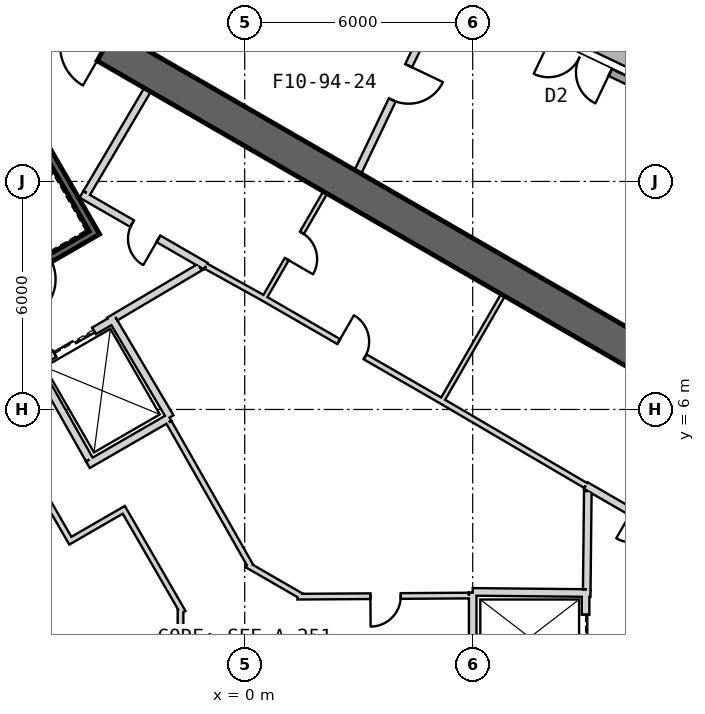
"""IFC4 building model, lengths in metres.
Left out: names, types, materials, properties, quantities, classifications, styles, units other than length and angle.
Written with IfcOpenShell. Run it as: python <this file> out.ifc"""

import sys

from ifc_helpers import new_model, si_unit, direction, frame, frame_2d, origin, place, context, subcontext, project, spatial, rectangle, extrude, element, fill, save


model = new_model("IFC4")
c1 = context("Model", 3, precision=1e-05, world=origin(), true_north=direction((0.0, 1.0)))
c2 = subcontext(c1, "Body", "Model", "MODEL_VIEW")
j1 = project(units=[si_unit("LENGTHUNIT", "METRE"), si_unit("PLANEANGLEUNIT", "RADIAN")], contexts=[c1])
p1 = place(None, origin())
s1 = spatial("IfcSite", under=j1, at=p1, CompositionType="ELEMENT")
p2 = place(p1, origin())
s2 = spatial("IfcBuilding", under=s1, at=p2, CompositionType="ELEMENT")
p3 = place(p2, frame((0.0, 0.0, 415.3)))
s3 = spatial("IfcBuildingStorey", under=s2, at=p3, CompositionType="ELEMENT", Elevation=415.3)
p4 = place(p3, frame((19.475, 2.208, 0.0), z_axis=(0.0, 0.0, 1.0), x_axis=(-0.866028369851, 0.499994862586, 0.0)))
e1 = element("IfcWall", 1, at=p4, inside=s3, PredefinedType="SHEAR", context=c2, shape_type="SweptSolid", body=[
    extrude(rectangle(XDim=31.523, YDim=0.9, at=frame_2d((15.762, 0.0))), origin(), (0.0, 0.0, 1.0), 5.0),
])
p5 = place(p4, frame((3.612, 0.0, 0.0)))
e2 = element("IfcOpeningElement", 2, at=p5, cuts=e1, PredefinedType="OPENING", context=c2, shape_type="SweptSolid", body=[
    extrude(rectangle(XDim=1.2, YDim=2.4, at=frame_2d((0.6, 1.2))), frame((0.0, 0.46, 0.0), z_axis=(0.0, -1.0, 0.0), x_axis=(1.0, 0.0, 0.0)), (0.0, 0.0, 1.0), 0.92),
])
p6 = place(p4, frame((26.712, 0.0, 0.0)))
e3 = element("IfcOpeningElement", 3, at=p6, cuts=e1, PredefinedType="OPENING", context=c2, shape_type="SweptSolid", body=[
    extrude(rectangle(XDim=1.2, YDim=2.4, at=frame_2d((0.6, 1.2))), frame((0.0, 0.46, 0.0), z_axis=(0.0, -1.0, 0.0), x_axis=(1.0, 0.0, 0.0)), (0.0, 0.0, 1.0), 0.92),
])
p7 = place(p3, frame((12.407, 13.534, 0.0), z_axis=(0.0, 0.0, 1.0), x_axis=(-0.902318881861, 0.431069177091, 0.0)))
e4 = element("IfcWall", 4, at=p7, inside=s3, PredefinedType="SOLIDWALL", context=c2, shape_type="SweptSolid", body=[
    extrude(rectangle(XDim=7.984, YDim=0.2, at=frame_2d((3.992, 0.0))), origin(), (0.0, 0.0, 1.0), 4.75),
])
p8 = place(p7, frame((3.092, 0.0, 0.0)))
e5 = element("IfcOpeningElement", 5, at=p8, cuts=e4, PredefinedType="OPENING", context=c2, shape_type="SweptSolid", body=[
    extrude(rectangle(XDim=1.8, YDim=2.4, at=frame_2d((0.9, 1.2))), frame((0.0, 0.11, 0.0), z_axis=(0.0, -1.0, 0.0), x_axis=(1.0, 0.0, 0.0)), (0.0, 0.0, 1.0), 0.22),
])
p9 = place(p3, frame((-2.391, 21.84, 0.04), z_axis=(0.0, 0.0, 1.0), x_axis=(0.902315972125, -0.43107526773, 0.0)))
e6 = element("IfcWall", 6, at=p9, inside=s3, PredefinedType="PARAPET", context=c2, shape_type="SweptSolid", body=[
    extrude(rectangle(XDim=26.04, YDim=0.25, at=frame_2d((13.02, 0.0))), origin(), (0.0, 0.0, 1.0), 1.2),
])
p10 = place(p3, frame((-2.146, 21.113, 0.04), z_axis=(0.0, 0.0, 1.0), x_axis=(0.902316759071, -0.43107362051, 0.0)))
e7 = element("IfcWall", 7, at=p10, inside=s3, PredefinedType="PARAPET", context=c2, shape_type="SweptSolid", body=[
    extrude(rectangle(XDim=24.864, YDim=0.5, at=frame_2d((12.432, 0.0))), origin(), (0.0, 0.0, 1.0), 0.6),
])
p11 = place(p3, frame((8.97, 1.2, 0.0), z_axis=(0.0, 0.0, 1.0), x_axis=(0.0, -1.0, 0.0)))
e8 = element("IfcWall", 8, at=p11, inside=s3, PredefinedType="PLUMBINGWALL", context=c2, shape_type="SweptSolid", body=[
    extrude(rectangle(XDim=2.4, YDim=0.2, at=frame_2d((1.2, 0.0))), origin(), (0.0, 0.0, 1.0), 4.75),
])
p12 = place(p11, frame((0.6, 0.0, 0.0)))
e9 = element("IfcOpeningElement", 9, at=p12, cuts=e8, PredefinedType="OPENING", context=c2, shape_type="SweptSolid", body=[
    extrude(rectangle(XDim=1.2, YDim=2.4, at=frame_2d((0.6, 1.2))), frame((0.0, 0.11, 0.0), z_axis=(0.0, -1.0, 0.0), x_axis=(1.0, 0.0, 0.0)), (0.0, 0.0, 1.0), 0.22),
])
p13 = place(p3, frame((6.0, 1.2, 0.0), z_axis=(0.0, 0.0, 1.0), x_axis=(0.999949988, -0.010001074852, 0.0)))
e10 = element("IfcWall", 10, at=p13, inside=s3, PredefinedType="PLUMBINGWALL", context=c2, shape_type="SweptSolid", body=[
    extrude(rectangle(XDim=3.1, YDim=0.2, at=frame_2d((1.55, 0.0))), origin(), (0.0, 0.0, 1.0), 4.75),
])
p14 = place(p3, frame((6.0, -1.1, 0.0), z_axis=(0.0, 0.0, 1.0), x_axis=(0.0, 1.0, 0.0)))
e11 = element("IfcWall", 11, at=p14, inside=s3, PredefinedType="PLUMBINGWALL", context=c2, shape_type="SweptSolid", body=[
    extrude(rectangle(XDim=2.28, YDim=0.2, at=frame_2d((1.14, 0.0))), origin(), (0.0, 0.0, 1.0), 4.75),
])
p15 = place(p3, frame((-7.854, 17.405, -0.25), z_axis=(0.0, 0.0, 1.0), x_axis=(0.499997992926, -0.866026562566, 0.0)))
e12 = element("IfcWall", 12, at=p15, inside=s3, PredefinedType="SHEAR", context=c2, shape_type="SweptSolid", body=[
    extrude(rectangle(XDim=7.9, YDim=0.2, at=frame_2d((3.95, 0.0))), origin(), (0.0, 0.0, 1.0), 5.0),
])
p16 = place(p3, frame((-7.159, 8.8, -0.25), z_axis=(0.0, 0.0, 1.0), x_axis=(0.866047807691, 0.499961193289, 0.0)))
e13 = element("IfcWall", 13, at=p16, inside=s3, PredefinedType="SHEAR", context=c2, shape_type="SweptSolid", body=[
    extrude(rectangle(XDim=3.6, YDim=0.2, at=frame_2d((1.8, 0.0))), origin(), (0.0, 0.0, 1.0), 5.0),
])
p17 = place(p16, frame((1.25, 0.0, 0.25)))
e14 = element("IfcOpeningElement", 14, at=p17, cuts=e13, PredefinedType="OPENING", context=c2, shape_type="SweptSolid", body=[
    extrude(rectangle(XDim=1.1, YDim=2.1, at=frame_2d((0.55, 1.05))), frame((0.0, 0.11, 0.0), z_axis=(0.0, -1.0, 0.0), x_axis=(1.0, 0.0, 0.0)), (0.0, 0.0, 1.0), 0.22),
])
p18 = place(p3, frame((-5.524, 7.168, 0.0), z_axis=(0.0, 0.0, 1.0), x_axis=(0.866024647952, 0.500001309137, 0.0)))
e15 = element("IfcWall", 15, at=p18, inside=s3, PredefinedType="PLUMBINGWALL", context=c2, shape_type="SweptSolid", body=[
    extrude(rectangle(XDim=2.4, YDim=0.2, at=frame_2d((1.2, 0.0))), origin(), (0.0, 0.0, 1.0), 4.75),
])
p19 = place(p18, frame((0.6, 0.0, 0.0)))
e16 = element("IfcOpeningElement", 16, at=p19, cuts=e15, PredefinedType="OPENING", context=c2, shape_type="SweptSolid", body=[
    extrude(rectangle(XDim=1.2, YDim=2.4, at=frame_2d((0.6, 1.2))), frame((0.0, 0.11, 0.0), z_axis=(0.0, -1.0, 0.0), x_axis=(1.0, 0.0, 0.0)), (0.0, 0.0, 1.0), 0.22),
])
p20 = place(p3, frame((-3.538, 8.465, 0.0), z_axis=(0.0, 0.0, 1.0), x_axis=(0.508647062354, -0.860975125052, 0.0)))
e17 = element("IfcWall", 17, at=p20, inside=s3, PredefinedType="PLUMBINGWALL", context=c2, shape_type="SweptSolid", body=[
    extrude(rectangle(XDim=3.1, YDim=0.2, at=frame_2d((1.55, 0.0))), origin(), (0.0, 0.0, 1.0), 4.75),
])
p21 = place(p3, frame((-1.979, 5.786, 0.0), z_axis=(0.0, 0.0, 1.0), x_axis=(-0.866016689309, -0.500015093611, 0.0)))
e18 = element("IfcWall", 18, at=p21, inside=s3, PredefinedType="PLUMBINGWALL", context=c2, shape_type="SweptSolid", body=[
    extrude(rectangle(XDim=2.479, YDim=0.2, at=frame_2d((1.24, 0.0))), origin(), (0.0, 0.0, 1.0), 4.75),
])
p22 = place(p3, frame((-5.562, 7.296, 0.0), z_axis=(0.0, 0.0, 1.0), x_axis=(0.49134651263, -0.870964180966, 0.0)))
e19 = element("IfcWall", 19, at=p22, inside=s3, PredefinedType="PLUMBINGWALL", context=c2, shape_type="SweptSolid", body=[
    extrude(rectangle(XDim=3.0, YDim=0.2, at=frame_2d((1.5, 0.0))), origin(), (0.0, 0.0, 1.0), 4.75),
])
p23 = place(p3, frame((6.795, 9.01, 0.0), z_axis=(0.0, 0.0, 1.0), x_axis=(-0.499984717929, -0.866034226713, 0.0)))
e20 = element("IfcWall", 20, at=p23, inside=s3, PredefinedType="PARTITIONING", context=c2, shape_type="SweptSolid", body=[
    extrude(rectangle(XDim=3.25, YDim=0.12, at=frame_2d((1.625, 0.0))), origin(), (0.0, 0.0, 1.0), 4.75),
])
p24 = place(p3, frame((-4.296, 11.66, 0.0), z_axis=(0.0, 0.0, 1.0), x_axis=(0.866027389382, -0.499996560828, 0.0)))
e21 = element("IfcWall", 21, at=p24, inside=s3, PredefinedType="PARTITIONING", context=c2, shape_type="SweptSolid", body=[
    extrude(rectangle(XDim=3.778, YDim=0.2, at=frame_2d((1.889, 0.0))), origin(), (0.0, 0.0, 1.0), 4.75),
])
p25 = place(p24, frame((1.539, 0.0, 0.0)))
e22 = element("IfcOpeningElement", 22, at=p25, cuts=e21, PredefinedType="OPENING", context=c2, shape_type="SweptSolid", body=[
    extrude(rectangle(XDim=0.8, YDim=2.1, at=frame_2d((0.4, 1.05))), frame((0.0, 0.11, 0.0), z_axis=(0.0, -1.0, 0.0), x_axis=(1.0, 0.0, 0.0)), (0.0, 0.0, 1.0), 0.22),
])
p26 = place(p3, frame((8.974, 3.999, 0.0), z_axis=(0.0, 0.0, 1.0), x_axis=(0.86601284211, -0.500021756827, 0.0)))
e23 = element("IfcWall", 23, at=p26, inside=s3, PredefinedType="PARTITIONING", context=c2, shape_type="SweptSolid", body=[
    extrude(rectangle(XDim=3.577, YDim=0.2, at=frame_2d((1.789, 0.0))), origin(), (0.0, 0.0, 1.0), 4.75),
])
p27 = place(p26, frame((1.389, 0.0, 0.0)))
e24 = element("IfcOpeningElement", 24, at=p27, cuts=e23, PredefinedType="OPENING", context=c2, shape_type="SweptSolid", body=[
    extrude(rectangle(XDim=0.8, YDim=2.1, at=frame_2d((0.4, 1.05))), frame((0.0, 0.11, 0.0), z_axis=(0.0, -1.0, 0.0), x_axis=(1.0, 0.0, 0.0)), (0.0, 0.0, 1.0), 0.22),
])
p28 = place(p3, frame((8.974, 3.999, 0.0), z_axis=(0.0, 0.0, 1.0), x_axis=(-0.862665579, 0.505774751059, 0.0)))
e25 = element("IfcWall", 25, at=p28, inside=s3, PredefinedType="PLUMBINGWALL", context=c2, shape_type="SweptSolid", body=[
    extrude(rectangle(XDim=4.423, YDim=0.15, at=frame_2d((2.211, 0.0))), origin(), (0.0, 0.0, 1.0), 4.75),
])
p29 = place(p3, frame((2.119, 11.709, 0.0), z_axis=(0.0, 0.0, 1.0), x_axis=(-0.500017246033, -0.866015446554, 0.0)))
e26 = element("IfcWall", 26, at=p29, inside=s3, PredefinedType="PARTITIONING", context=c2, shape_type="SweptSolid", body=[
    extrude(rectangle(XDim=3.25, YDim=0.12, at=frame_2d((1.625, 0.0))), origin(), (0.0, 0.0, 1.0), 4.75),
])
p30 = place(p29, frame((1.225, 0.0, 0.0)))
e27 = element("IfcOpeningElement", 27, at=p30, cuts=e26, PredefinedType="OPENING", context=c2, shape_type="SweptSolid", body=[
    extrude(rectangle(XDim=0.8, YDim=2.1, at=frame_2d((0.4, 1.05))), frame((0.0, 0.07, 0.0), z_axis=(0.0, -1.0, 0.0), x_axis=(1.0, 0.0, 0.0)), (0.0, 0.0, 1.0), 0.14),
])
p31 = place(p3, frame((5.159, 6.236, 0.0), z_axis=(0.0, 0.0, 1.0), x_axis=(-0.866028230842, 0.499995103361, 0.0)))
e28 = element("IfcWall", 28, at=p31, inside=s3, PredefinedType="PLUMBINGWALL", context=c2, shape_type="SweptSolid", body=[
    extrude(rectangle(XDim=5.4, YDim=0.15, at=frame_2d((2.7, 0.0))), origin(), (0.0, 0.0, 1.0), 4.75),
])
p32 = place(p31, frame((2.3, 0.0, 0.0)))
e29 = element("IfcOpeningElement", 29, at=p32, cuts=e28, PredefinedType="OPENING", context=c2, shape_type="SweptSolid", body=[
    extrude(rectangle(XDim=0.8, YDim=2.1, at=frame_2d((0.4, 1.05))), frame((0.0, 0.085, 0.0), z_axis=(0.0, -1.0, 0.0), x_axis=(1.0, 0.0, 0.0)), (0.0, 0.0, 1.0), 0.17),
])
p33 = place(p3, frame((-2.558, 14.409, 0.0), z_axis=(0.0, 0.0, 1.0), x_axis=(-0.508018930956, -0.861345903683, 0.0)))
e30 = element("IfcWall", 30, at=p33, inside=s3, PredefinedType="PARTITIONING", context=c2, shape_type="SweptSolid", body=[
    extrude(rectangle(XDim=3.15, YDim=0.2, at=frame_2d((1.575, 0.0))), origin(), (0.0, 0.0, 1.0), 4.75),
])
p34 = place(p3, frame((0.483, 8.936, 0.0), z_axis=(0.0, 0.0, 1.0), x_axis=(-0.874290944206, 0.485402250592, 0.0)))
e31 = element("IfcWall", 31, at=p34, inside=s3, PredefinedType="PLUMBINGWALL", context=c2, shape_type="SweptSolid", body=[
    extrude(rectangle(XDim=1.723, YDim=0.15, at=frame_2d((0.861, 0.0))), origin(), (0.0, 0.0, 1.0), 4.75),
])
for number, where, z_axis, x_axis in (
    (32, (9.001, 1.27, 0.0), (0.0, 0.0, 1.0), (0.011, 1.0, 0.0)),
    (33, (-1.179, 9.745, 0.0), (0.0, 0.0, 1.0), (-0.861, -0.509, 0.0)),
):
    element("IfcWall", number, at=place(p3, frame(where, z_axis=z_axis, x_axis=x_axis)), inside=s3, PredefinedType="PARTITIONING", context=c2, shape_type="SweptSolid", body=[
        extrude(rectangle(XDim=2.582, YDim=0.2, at=frame_2d((1.291, 0.0))), origin(), (0.0, 0.0, 1.0), 4.75),
    ])
p35 = place(p3, frame((1.388, 1.074, 0.0), z_axis=(0.0, 0.0, 1.0), x_axis=(0.99997856967, 0.006546770205, 0.0)))
e34 = element("IfcWall", 34, at=p35, inside=s3, PredefinedType="PLUMBINGWALL", context=c2, shape_type="SweptSolid", body=[
    extrude(rectangle(XDim=4.512, YDim=0.15, at=frame_2d((2.256, 0.0))), origin(), (0.0, 0.0, 1.0), 4.75),
])
p36 = place(p35, frame((1.92, 0.0, 0.0)))
e35 = element("IfcOpeningElement", 35, at=p36, cuts=e34, PredefinedType="OPENING", context=c2, shape_type="SweptSolid", body=[
    extrude(rectangle(XDim=0.8, YDim=2.1, at=frame_2d((0.4, 1.05))), frame((0.0, 0.085, 0.0), z_axis=(0.0, -1.0, 0.0), x_axis=(1.0, 0.0, 0.0)), (0.0, 0.0, 1.0), 0.17),
])
p37 = place(p3, frame((0.062, 1.914, 0.0), z_axis=(0.0, 0.0, 1.0), x_axis=(0.866018462269, -0.500012022864, 0.0)))
e36 = element("IfcWall", 36, at=p37, inside=s3, PredefinedType="PLUMBINGWALL", context=c2, shape_type="SweptSolid", body=[
    extrude(rectangle(XDim=1.654, YDim=0.15, at=frame_2d((0.827, 0.0))), origin(), (0.0, 0.0, 1.0), 4.75),
])
p38 = place(p3, frame((-1.994, 5.661, 0.0), z_axis=(0.0, 0.0, 1.0), x_axis=(0.494341211302, -0.869267948798, 0.0)))
e37 = element("IfcWall", 37, at=p38, inside=s3, PredefinedType="PLUMBINGWALL", context=c2, shape_type="SweptSolid", body=[
    extrude(rectangle(XDim=4.361, YDim=0.15, at=frame_2d((2.18, 0.0))), origin(), (0.0, 0.0, 1.0), 4.75),
])
p39 = place(p3, frame((-4.551, 2.482, 0.0), z_axis=(0.0, 0.0, 1.0), x_axis=(-0.499990139034, 0.866031096941, 0.0)))
e38 = element("IfcWall", 38, at=p39, inside=s3, PredefinedType="PLUMBINGWALL", context=c2, shape_type="SweptSolid", body=[
    extrude(rectangle(XDim=3.0, YDim=0.15, at=frame_2d((1.5, 0.0))), origin(), (0.0, 0.0, 1.0), 4.75),
])
p40 = place(p3, frame((-3.116, 3.397, 0.0), z_axis=(0.0, 0.0, 1.0), x_axis=(-0.866053003207, -0.499952193351, 0.0)))
e39 = element("IfcWall", 39, at=p40, inside=s3, PredefinedType="PLUMBINGWALL", context=c2, shape_type="SweptSolid", body=[
    extrude(rectangle(XDim=1.625, YDim=0.15, at=frame_2d((0.812, 0.0))), origin(), (0.0, 0.0, 1.0), 4.75),
])
p41 = place(p3, frame((-1.624, 0.663, 0.0), z_axis=(0.0, 0.0, 1.0), x_axis=(-0.500035348339, 0.866004994449, 0.0)))
e40 = element("IfcWall", 40, at=p41, inside=s3, PredefinedType="PLUMBINGWALL", context=c2, shape_type="SweptSolid", body=[
    extrude(rectangle(XDim=3.039, YDim=0.15, at=frame_2d((1.52, 0.0))), origin(), (0.0, 0.0, 1.0), 4.75),
])
p42 = place(p3, frame((-1.689, -0.905, 0.0), z_axis=(0.0, 0.0, 1.0), x_axis=(0.0, 1.0, 0.0)))
e41 = element("IfcWall", 41, at=p42, inside=s3, PredefinedType="PLUMBINGWALL", context=c2, shape_type="SweptSolid", body=[
    extrude(rectangle(XDim=1.656, YDim=0.15, at=frame_2d((0.828, 0.0))), origin(), (0.0, 0.0, 1.0), 4.75),
])
p43 = place(p3, frame((5.176, 16.85, 0.0), z_axis=(0.0, 0.0, 1.0), x_axis=(-0.431140150859, -0.902284971789, 0.0)))
e42 = element("IfcWall", 42, at=p43, inside=s3, PredefinedType="PARTITIONING", context=c2, shape_type="SweptSolid", body=[
    extrude(rectangle(XDim=5.096, YDim=0.2, at=frame_2d((2.548, 0.0))), origin(), (0.0, 0.0, 1.0), 4.75),
])
p44 = place(p43, frame((2.0, 0.0, 0.0)))
e43 = element("IfcOpeningElement", 43, at=p44, cuts=e42, PredefinedType="OPENING", context=c2, shape_type="SweptSolid", body=[
    extrude(rectangle(XDim=1.0, YDim=2.1, at=frame_2d((0.5, 1.05))), frame((0.0, 0.11, 0.0), z_axis=(0.0, -1.0, 0.0), x_axis=(1.0, 0.0, 0.0)), (0.0, 0.0, 1.0), 0.22),
])
p45 = place(p8, frame((1.8, 0.0, 0.0), z_axis=(0.0, 0.0, 1.0), x_axis=(-1.0, 0.0, 0.0)))
e44 = element("IfcDoor", 44, at=p45, inside=s3, OperationType="SINGLE_SWING_RIGHT", PredefinedType="DOOR", context=c2, shape_type="SweptSolid", body=[
    extrude(rectangle(XDim=1.8, YDim=2.4, at=frame_2d((0.9, 1.2))), frame((0.0, 0.025, 0.0), z_axis=(0.0, -1.0, 0.0), x_axis=(1.0, 0.0, 0.0)), (0.0, 0.0, 1.0), 0.05),
])
fill(e5, e44)
p46 = place(p12, origin())
e45 = element("IfcDoor", 45, at=p46, inside=s3, OperationType="SLIDING_TO_LEFT", PredefinedType="USERDEFINED", context=c2, shape_type="SweptSolid", body=[
    extrude(rectangle(XDim=1.2, YDim=2.4, at=frame_2d((0.6, 1.2))), frame((0.0, 0.025, 0.0), z_axis=(0.0, -1.0, 0.0), x_axis=(1.0, 0.0, 0.0)), (0.0, 0.0, 1.0), 0.05),
])
fill(e9, e45)
p47 = place(p19, origin())
e46 = element("IfcDoor", 46, at=p47, inside=s3, OperationType="SLIDING_TO_LEFT", PredefinedType="USERDEFINED", context=c2, shape_type="SweptSolid", body=[
    extrude(rectangle(XDim=1.2, YDim=2.4, at=frame_2d((0.6, 1.2))), frame((0.0, 0.025, 0.0), z_axis=(0.0, -1.0, 0.0), x_axis=(1.0, 0.0, 0.0)), (0.0, 0.0, 1.0), 0.05),
])
fill(e16, e46)
p48 = place(p36, origin())
e47 = element("IfcDoor", 47, at=p48, inside=s3, OperationType="SINGLE_SWING_LEFT", PredefinedType="USERDEFINED", context=c2, shape_type="SweptSolid", body=[
    extrude(rectangle(XDim=0.8, YDim=2.1, at=frame_2d((0.4, 1.05))), frame((0.0, 0.025, 0.0), z_axis=(0.0, -1.0, 0.0), x_axis=(1.0, 0.0, 0.0)), (0.0, 0.0, 1.0), 0.05),
])
fill(e35, e47)
p49 = place(p30, origin())
e48 = element("IfcDoor", 48, at=p49, inside=s3, OperationType="SINGLE_SWING_RIGHT", PredefinedType="USERDEFINED", context=c2, shape_type="SweptSolid", body=[
    extrude(rectangle(XDim=0.8, YDim=2.1, at=frame_2d((0.4, 1.05))), frame((0.0, 0.025, 0.0), z_axis=(0.0, -1.0, 0.0), x_axis=(1.0, 0.0, 0.0)), (0.0, 0.0, 1.0), 0.05),
])
fill(e27, e48)
p50 = place(p25, origin())
e49 = element("IfcDoor", 49, at=p50, inside=s3, OperationType="SINGLE_SWING_RIGHT", PredefinedType="USERDEFINED", context=c2, shape_type="SweptSolid", body=[
    extrude(rectangle(XDim=0.8, YDim=2.1, at=frame_2d((0.4, 1.05))), frame((0.0, 0.025, 0.0), z_axis=(0.0, -1.0, 0.0), x_axis=(1.0, 0.0, 0.0)), (0.0, 0.0, 1.0), 0.05),
])
fill(e22, e49)
p51 = place(p32, origin())
e50 = element("IfcDoor", 50, at=p51, inside=s3, OperationType="SINGLE_SWING_RIGHT", PredefinedType="USERDEFINED", context=c2, shape_type="SweptSolid", body=[
    extrude(rectangle(XDim=0.8, YDim=2.1, at=frame_2d((0.4, 1.05))), frame((0.0, 0.025, 0.0), z_axis=(0.0, -1.0, 0.0), x_axis=(1.0, 0.0, 0.0)), (0.0, 0.0, 1.0), 0.05),
])
fill(e29, e50)
p52 = place(p44, origin())
e51 = element("IfcDoor", 51, at=p52, inside=s3, OperationType="SINGLE_SWING_LEFT", PredefinedType="USERDEFINED", context=c2, shape_type="SweptSolid", body=[
    extrude(rectangle(XDim=1.0, YDim=2.1, at=frame_2d((0.5, 1.05))), frame((0.0, 0.025, 0.0), z_axis=(0.0, -1.0, 0.0), x_axis=(1.0, 0.0, 0.0)), (0.0, 0.0, 1.0), 0.05),
])
fill(e43, e51)
save(model, sys.argv[1])
